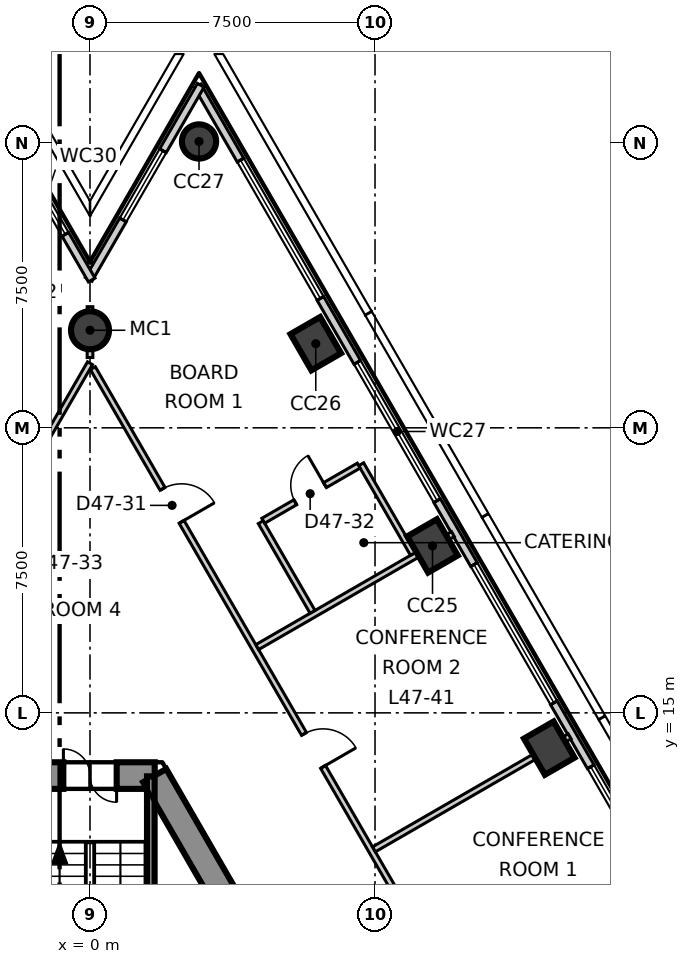
"""IFC4 building model, lengths in metres.
Left out: names, types, materials, properties, quantities, classifications, styles, units other than length and angle.
Written with IfcOpenShell. Run it as: python <this file> out.ifc"""

import sys

from ifc_helpers import new_model, si_unit, direction, frame, frame_2d, origin, origin_2d, place, context, subcontext, project, spatial, polyline, rectangle, circle, outline, extrude, element, fill, save


model = new_model("IFC4")
c1 = context("Model", 3, precision=1e-05, world=origin(), true_north=direction((0.0, 1.0)))
c2 = subcontext(c1, "Body", "Model", "MODEL_VIEW")
j1 = project(units=[si_unit("LENGTHUNIT", "METRE"), si_unit("PLANEANGLEUNIT", "RADIAN")], contexts=[c1])
p1 = place(None, origin())
s1 = spatial("IfcSite", under=j1, at=p1, CompositionType="ELEMENT")
p2 = place(p1, origin())
s2 = spatial("IfcBuilding", under=s1, at=p2, CompositionType="ELEMENT")
p3 = place(p2, frame((0.0, 0.0, 203.3)))
s3 = spatial("IfcBuildingStorey", under=s2, at=p3, CompositionType="ELEMENT", Elevation=203.3)
p4 = place(p3, frame((1.703, 13.35, -0.3), z_axis=(0.0, 0.0, 1.0), x_axis=(-1.0, 0.0, 0.0)))
e1 = element("IfcWall", 1, at=p4, inside=s3, PredefinedType="SHEAR", context=c2, shape_type="SweptSolid", body=[
    extrude(outline(polyline([(-0.202, -0.35), (1.703, -0.35), (3.608, -0.35), (3.204, 0.35), (1.703, 0.35), (0.202, 0.35), (-0.202, -0.35)])), origin(), (0.0, 0.0, 1.0), 4.0),
])
p5 = place(p4, frame((1.003, 0.0, 0.3)))
e2 = element("IfcOpeningElement", 2, at=p5, cuts=e1, PredefinedType="OPENING", context=c2, shape_type="SweptSolid", body=[
    extrude(rectangle(XDim=1.4, YDim=2.1, at=frame_2d((0.7, 1.05))), frame((0.0, 0.36, 0.0), z_axis=(0.0, -1.0, 0.0), x_axis=(1.0, 0.0, 0.0)), (0.0, 0.0, 1.0), 0.72),
])
p6 = place(p3, frame((12.413, -5.2, -0.3), z_axis=(0.0, 0.0, 1.0), x_axis=(-0.500011533395, 0.866018744874, 0.0)))
e3 = element("IfcWall", 3, at=p6, inside=s3, PredefinedType="SHEAR", context=c2, shape_type="SweptSolid", body=[
    extrude(outline(polyline([(-0.202, -0.35), (1.782, -0.35), (3.766, -0.35), (5.75, -0.35), (7.734, -0.35), (9.718, -0.35), (11.702, -0.35), (13.686, -0.35), (15.67, -0.35), (17.654, -0.35), (19.638, -0.35), (21.622, -0.35), (21.218, 0.35), (19.307, 0.35), (17.397, 0.35), (15.486, 0.35), (13.576, 0.35), (11.665, 0.35), (9.755, 0.35), (7.844, 0.35), (5.934, 0.35), (4.023, 0.35), (2.113, 0.35), (0.202, 0.35), (-0.202, -0.35)])), origin(), (0.0, 0.0, 1.0), 4.0),
])
p7 = place(p6, frame((4.055, 0.0, 0.3)))
e4 = element("IfcOpeningElement", 4, at=p7, cuts=e3, PredefinedType="OPENING", context=c2, shape_type="SweptSolid", body=[
    extrude(rectangle(XDim=0.9, YDim=2.1, at=frame_2d((0.45, 1.05))), frame((0.0, 0.36, 0.0), z_axis=(0.0, -1.0, 0.0), x_axis=(1.0, 0.0, 0.0)), (0.0, 0.0, 1.0), 0.72),
])
p8 = place(p6, frame((16.415, 0.0, 0.3)))
e5 = element("IfcOpeningElement", 5, at=p8, cuts=e3, PredefinedType="OPENING", context=c2, shape_type="SweptSolid", body=[
    extrude(rectangle(XDim=1.0, YDim=2.1, at=frame_2d((0.5, 1.05))), frame((0.0, 0.36, 0.0), z_axis=(0.0, -1.0, 0.0), x_axis=(1.0, 0.0, 0.0)), (0.0, 0.0, 1.0), 0.72),
])
for number, where, z_axis, x_axis in (
    (6, (12.085, 14.072, -0.3), (0.0, 0.0, 1.0), (-0.5, 0.866, 0.0)),
    (7, (9.013, 19.393, -0.3), (0.0, 0.0, 1.0), (-0.5, 0.866, 0.0)),
    (8, (5.941, 24.714, -0.3), (0.0, 0.0, 1.0), (-0.5, 0.866, 0.0)),
):
    element("IfcColumn", number, at=place(p3, frame(where, z_axis=z_axis, x_axis=x_axis)), inside=s3, PredefinedType="COLUMN", context=c2, shape_type="SweptSolid", body=[
        extrude(rectangle(XDim=1.1, YDim=0.9, at=origin_2d()), origin(), (0.0, 0.0, 1.0), 4.0),
    ])
p9 = place(p3, frame((2.869, 30.035, -0.3), z_axis=(0.0, 0.0, 1.0), x_axis=(-0.5, 0.866025403784, 0.0)))
e9 = element("IfcColumn", 9, at=p9, inside=s3, PredefinedType="COLUMN", context=c2, shape_type="SweptSolid", body=[
    extrude(circle(Radius=0.45, at=origin_2d()), origin(), (0.0, 0.0, 1.0), 4.0),
])
p10 = place(p3, frame((0.0, 25.067, -0.3), z_axis=(0.0, 0.0, 1.0), x_axis=(1.0, 0.0, 0.0)))
e10 = element("IfcColumn", 10, at=p10, inside=s3, PredefinedType="COLUMN", context=c2, shape_type="SweptSolid", body=[
    extrude(circle(Radius=0.5, at=origin_2d()), origin(), (0.0, 0.0, 1.0), 4.0),
])
p11 = place(p3, frame((28.704, -13.311, 0.0), z_axis=(0.0, 0.0, 1.0), x_axis=(-0.500010281129, 0.866019467891, 0.0)))
e11 = element("IfcWall", 11, at=p11, inside=s3, PredefinedType="ELEMENTEDWALL", context=c2, shape_type="SweptSolid", body=[
    extrude(rectangle(XDim=51.739, YDim=0.2, at=frame_2d((25.87, 0.0))), origin(), (0.0, 0.0, 1.0), 3.7),
])
p12 = place(p11, frame((2.275, 0.0, 0.9)))
e12 = element("IfcOpeningElement", 12, at=p12, cuts=e11, PredefinedType="OPENING", context=c2, shape_type="SweptSolid", body=[
    extrude(rectangle(XDim=4.2, YDim=2.5, at=frame_2d((2.1, 1.25))), frame((0.0, 0.11, 0.0), z_axis=(0.0, -1.0, 0.0), x_axis=(1.0, 0.0, 0.0)), (0.0, 0.0, 1.0), 0.22),
])
p13 = place(p11, frame((8.419, 0.0, 0.9)))
e13 = element("IfcOpeningElement", 13, at=p13, cuts=e11, PredefinedType="OPENING", context=c2, shape_type="SweptSolid", body=[
    extrude(rectangle(XDim=4.2, YDim=2.5, at=frame_2d((2.1, 1.25))), frame((0.0, 0.11, 0.0), z_axis=(0.0, -1.0, 0.0), x_axis=(1.0, 0.0, 0.0)), (0.0, 0.0, 1.0), 0.22),
])
p14 = place(p11, frame((14.563, 0.0, 0.9)))
e14 = element("IfcOpeningElement", 14, at=p14, cuts=e11, PredefinedType="OPENING", context=c2, shape_type="SweptSolid", body=[
    extrude(rectangle(XDim=4.2, YDim=2.5, at=frame_2d((2.1, 1.25))), frame((0.0, 0.11, 0.0), z_axis=(0.0, -1.0, 0.0), x_axis=(1.0, 0.0, 0.0)), (0.0, 0.0, 1.0), 0.22),
])
p15 = place(p11, frame((20.707, 0.0, 0.9)))
e15 = element("IfcOpeningElement", 15, at=p15, cuts=e11, PredefinedType="OPENING", context=c2, shape_type="SweptSolid", body=[
    extrude(rectangle(XDim=4.2, YDim=2.5, at=frame_2d((2.1, 1.25))), frame((0.0, 0.11, 0.0), z_axis=(0.0, -1.0, 0.0), x_axis=(1.0, 0.0, 0.0)), (0.0, 0.0, 1.0), 0.22),
])
p16 = place(p11, frame((26.852, 0.0, 0.9)))
e16 = element("IfcOpeningElement", 16, at=p16, cuts=e11, PredefinedType="OPENING", context=c2, shape_type="SweptSolid", body=[
    extrude(rectangle(XDim=4.2, YDim=2.5, at=frame_2d((2.1, 1.25))), frame((0.0, 0.11, 0.0), z_axis=(0.0, -1.0, 0.0), x_axis=(1.0, 0.0, 0.0)), (0.0, 0.0, 1.0), 0.22),
])
p17 = place(p11, frame((32.996, 0.0, 0.9)))
e17 = element("IfcOpeningElement", 17, at=p17, cuts=e11, PredefinedType="OPENING", context=c2, shape_type="SweptSolid", body=[
    extrude(rectangle(XDim=4.2, YDim=2.5, at=frame_2d((2.1, 1.25))), frame((0.0, 0.11, 0.0), z_axis=(0.0, -1.0, 0.0), x_axis=(1.0, 0.0, 0.0)), (0.0, 0.0, 1.0), 0.22),
])
p18 = place(p11, frame((39.14, 0.0, 0.9)))
e18 = element("IfcOpeningElement", 18, at=p18, cuts=e11, PredefinedType="OPENING", context=c2, shape_type="SweptSolid", body=[
    extrude(rectangle(XDim=4.2, YDim=2.5, at=frame_2d((2.1, 1.25))), frame((0.0, 0.11, 0.0), z_axis=(0.0, -1.0, 0.0), x_axis=(1.0, 0.0, 0.0)), (0.0, 0.0, 1.0), 0.22),
])
p19 = place(p11, frame((45.284, 0.0, 0.9)))
e19 = element("IfcOpeningElement", 19, at=p19, cuts=e11, PredefinedType="OPENING", context=c2, shape_type="SweptSolid", body=[
    extrude(rectangle(XDim=4.2, YDim=2.5, at=frame_2d((2.1, 1.25))), frame((0.0, 0.11, 0.0), z_axis=(0.0, -1.0, 0.0), x_axis=(1.0, 0.0, 0.0)), (0.0, 0.0, 1.0), 0.22),
])
p20 = place(p3, frame((2.914, 31.513, 0.0), z_axis=(0.0, 0.0, 1.0), x_axis=(-0.500061696128, -0.865989780578, 0.0)))
e20 = element("IfcWall", 20, at=p20, inside=s3, PredefinedType="ELEMENTEDWALL", context=c2, shape_type="SweptSolid", body=[
    extrude(rectangle(XDim=5.897, YDim=0.2, at=frame_2d((2.949, 0.0))), origin(), (0.0, 0.0, 1.0), 3.7),
])
p21 = place(p20, frame((1.99, 0.0, 0.9)))
e21 = element("IfcOpeningElement", 21, at=p21, cuts=e20, PredefinedType="OPENING", context=c2, shape_type="SweptSolid", body=[
    extrude(rectangle(XDim=2.1, YDim=2.5, at=frame_2d((1.05, 1.25))), frame((0.0, 0.11, 0.0), z_axis=(0.0, -1.0, 0.0), x_axis=(1.0, 0.0, 0.0)), (0.0, 0.0, 1.0), 0.22),
])
p22 = place(p3, frame((0.045, 26.389, 0.0), z_axis=(0.0, 0.0, 1.0), x_axis=(-0.500043768782, 0.866000132391, 0.0)))
e22 = element("IfcWall", 22, at=p22, inside=s3, PredefinedType="ELEMENTEDWALL", context=c2, shape_type="SweptSolid", body=[
    extrude(rectangle(XDim=5.897, YDim=0.2, at=frame_2d((2.949, 0.0))), origin(), (0.0, 0.0, 1.0), 3.7),
])
p23 = place(p22, frame((1.39, 0.0, 0.9)))
e23 = element("IfcOpeningElement", 23, at=p23, cuts=e22, PredefinedType="OPENING", context=c2, shape_type="SweptSolid", body=[
    extrude(rectangle(XDim=2.1, YDim=2.5, at=frame_2d((1.05, 1.25))), frame((0.0, 0.11, 0.0), z_axis=(0.0, -1.0, 0.0), x_axis=(1.0, 0.0, 0.0)), (0.0, 0.0, 1.0), 0.22),
])
p24 = place(p3, frame((-20.883, -11.97, 0.0), z_axis=(0.0, 0.0, 1.0), x_axis=(0.500006150555, 0.866021852731, 0.0)))
e24 = element("IfcWall", 24, at=p24, inside=s3, PredefinedType="PARTITIONING", context=c2, shape_type="SweptSolid", body=[
    extrude(rectangle(XDim=41.766, YDim=0.15, at=frame_2d((20.883, 0.0))), origin(), (0.0, 0.0, 1.0), 3.7),
])
p25 = place(p24, frame((36.916, 0.0, 0.0)))
e25 = element("IfcOpeningElement", 25, at=p25, cuts=e24, PredefinedType="OPENING", context=c2, shape_type="SweptSolid", body=[
    extrude(rectangle(XDim=1.1, YDim=2.1, at=frame_2d((0.55, 1.05))), frame((0.0, 0.085, 0.0), z_axis=(0.0, -1.0, 0.0), x_axis=(1.0, 0.0, 0.0)), (0.0, 0.0, 1.0), 0.17),
])
p26 = place(p24, frame((26.446, 0.0, 0.0)))
e26 = element("IfcOpeningElement", 26, at=p26, cuts=e24, PredefinedType="OPENING", context=c2, shape_type="SweptSolid", body=[
    extrude(rectangle(XDim=1.1, YDim=2.1, at=frame_2d((0.55, 1.05))), frame((0.0, 0.085, 0.0), z_axis=(0.0, -1.0, 0.0), x_axis=(1.0, 0.0, 0.0)), (0.0, 0.0, 1.0), 0.17),
])
p27 = place(p24, frame((9.757, 0.0, 0.0)))
e27 = element("IfcOpeningElement", 27, at=p27, cuts=e24, PredefinedType="OPENING", context=c2, shape_type="SweptSolid", body=[
    extrude(rectangle(XDim=1.1, YDim=2.1, at=frame_2d((0.55, 1.05))), frame((0.0, 0.085, 0.0), z_axis=(0.0, -1.0, 0.0), x_axis=(1.0, 0.0, 0.0)), (0.0, 0.0, 1.0), 0.17),
])
p28 = place(p24, frame((18.757, 0.0, 0.0)))
e28 = element("IfcOpeningElement", 28, at=p28, cuts=e24, PredefinedType="OPENING", context=c2, shape_type="SweptSolid", body=[
    extrude(rectangle(XDim=0.9, YDim=2.1, at=frame_2d((0.45, 1.05))), frame((0.0, 0.085, 0.0), z_axis=(0.0, -1.0, 0.0), x_axis=(1.0, 0.0, 0.0)), (0.0, 0.0, 1.0), 0.17),
])
p29 = place(p24, frame((15.557, 0.0, 0.0)))
e29 = element("IfcOpeningElement", 29, at=p29, cuts=e24, PredefinedType="OPENING", context=c2, shape_type="SweptSolid", body=[
    extrude(rectangle(XDim=0.9, YDim=2.1, at=frame_2d((0.45, 1.05))), frame((0.0, 0.085, 0.0), z_axis=(0.0, -1.0, 0.0), x_axis=(1.0, 0.0, 0.0)), (0.0, 0.0, 1.0), 0.17),
])
p30 = place(p24, frame((12.657, 0.0, 0.0)))
e30 = element("IfcOpeningElement", 30, at=p30, cuts=e24, PredefinedType="OPENING", context=c2, shape_type="SweptSolid", body=[
    extrude(rectangle(XDim=1.0, YDim=2.1, at=frame_2d((0.5, 1.05))), frame((0.0, 0.085, 0.0), z_axis=(0.0, -1.0, 0.0), x_axis=(1.0, 0.0, 0.0)), (0.0, 0.0, 1.0), 0.17),
])
p31 = place(p24, frame((3.669, 0.0, 0.0)))
e31 = element("IfcOpeningElement", 31, at=p31, cuts=e24, PredefinedType="OPENING", context=c2, shape_type="SweptSolid", body=[
    extrude(rectangle(XDim=1.1, YDim=2.1, at=frame_2d((0.55, 1.05))), frame((0.0, 0.085, 0.0), z_axis=(0.0, -1.0, 0.0), x_axis=(1.0, 0.0, 0.0)), (0.0, 0.0, 1.0), 0.17),
])
p32 = place(p3, frame((0.0, 24.35, 0.0), z_axis=(0.0, 0.0, 1.0), x_axis=(0.0, 1.0, 0.0)))
e32 = element("IfcWall", 32, at=p32, inside=s3, PredefinedType="PARTITIONING", context=c2, shape_type="SweptSolid", body=[
    extrude(rectangle(XDim=1.337, YDim=0.15, at=frame_2d((0.668, 0.0))), origin(), (0.0, 0.0, 1.0), 3.2),
])
p33 = place(p3, frame((0.075, 24.07, 0.0), z_axis=(0.0, 0.0, 1.0), x_axis=(0.500006834213, -0.866021458014, 0.0)))
e33 = element("IfcWall", 33, at=p33, inside=s3, PredefinedType="PARTITIONING", context=c2, shape_type="SweptSolid", body=[
    extrude(rectangle(XDim=41.616, YDim=0.15, at=frame_2d((20.808, 0.0))), origin(), (0.0, 0.0, 1.0), 3.7),
])
p34 = place(p33, frame((36.915, 0.0, 0.0)))
e34 = element("IfcOpeningElement", 34, at=p34, cuts=e33, PredefinedType="OPENING", context=c2, shape_type="SweptSolid", body=[
    extrude(rectangle(XDim=1.1, YDim=2.1, at=frame_2d((0.55, 1.05))), frame((0.0, 0.085, 0.0), z_axis=(0.0, -1.0, 0.0), x_axis=(1.0, 0.0, 0.0)), (0.0, 0.0, 1.0), 0.17),
])
p35 = place(p33, frame((22.046, 0.0, 0.0)))
e35 = element("IfcOpeningElement", 35, at=p35, cuts=e33, PredefinedType="OPENING", context=c2, shape_type="SweptSolid", body=[
    extrude(rectangle(XDim=1.1, YDim=2.1, at=frame_2d((0.55, 1.05))), frame((0.0, 0.085, 0.0), z_axis=(0.0, -1.0, 0.0), x_axis=(1.0, 0.0, 0.0)), (0.0, 0.0, 1.0), 0.17),
])
p36 = place(p33, frame((31.046, 0.0, 0.0)))
e36 = element("IfcOpeningElement", 36, at=p36, cuts=e33, PredefinedType="OPENING", context=c2, shape_type="SweptSolid", body=[
    extrude(rectangle(XDim=0.9, YDim=2.1, at=frame_2d((0.45, 1.05))), frame((0.0, 0.085, 0.0), z_axis=(0.0, -1.0, 0.0), x_axis=(1.0, 0.0, 0.0)), (0.0, 0.0, 1.0), 0.17),
])
p37 = place(p33, frame((27.846, 0.0, 0.0)))
e37 = element("IfcOpeningElement", 37, at=p37, cuts=e33, PredefinedType="OPENING", context=c2, shape_type="SweptSolid", body=[
    extrude(rectangle(XDim=0.9, YDim=2.1, at=frame_2d((0.45, 1.05))), frame((0.0, 0.085, 0.0), z_axis=(0.0, -1.0, 0.0), x_axis=(1.0, 0.0, 0.0)), (0.0, 0.0, 1.0), 0.17),
])
p38 = place(p33, frame((24.946, 0.0, 0.0)))
e38 = element("IfcOpeningElement", 38, at=p38, cuts=e33, PredefinedType="OPENING", context=c2, shape_type="SweptSolid", body=[
    extrude(rectangle(XDim=1.0, YDim=2.1, at=frame_2d((0.5, 1.05))), frame((0.0, 0.085, 0.0), z_axis=(0.0, -1.0, 0.0), x_axis=(1.0, 0.0, 0.0)), (0.0, 0.0, 1.0), 0.17),
])
p39 = place(p33, frame((17.258, 0.0, 0.0)))
e39 = element("IfcOpeningElement", 39, at=p39, cuts=e33, PredefinedType="OPENING", context=c2, shape_type="SweptSolid", body=[
    extrude(rectangle(XDim=1.0, YDim=2.1, at=frame_2d((0.5, 1.05))), frame((0.0, 0.085, 0.0), z_axis=(0.0, -1.0, 0.0), x_axis=(1.0, 0.0, 0.0)), (0.0, 0.0, 1.0), 0.17),
])
p40 = place(p33, frame((11.114, 0.0, 0.0)))
e40 = element("IfcOpeningElement", 40, at=p40, cuts=e33, PredefinedType="OPENING", context=c2, shape_type="SweptSolid", body=[
    extrude(rectangle(XDim=1.0, YDim=2.1, at=frame_2d((0.5, 1.05))), frame((0.0, 0.085, 0.0), z_axis=(0.0, -1.0, 0.0), x_axis=(1.0, 0.0, 0.0)), (0.0, 0.0, 1.0), 0.17),
])
p41 = place(p33, frame((3.669, 0.0, 0.0)))
e41 = element("IfcOpeningElement", 41, at=p41, cuts=e33, PredefinedType="OPENING", context=c2, shape_type="SweptSolid", body=[
    extrude(rectangle(XDim=1.0, YDim=2.1, at=frame_2d((0.5, 1.05))), frame((0.0, 0.085, 0.0), z_axis=(0.0, -1.0, 0.0), x_axis=(1.0, 0.0, 0.0)), (0.0, 0.0, 1.0), 0.17),
])
p42 = place(p3, frame((4.4, 16.73, 0.0), z_axis=(0.0, 0.0, 1.0), x_axis=(0.866064581528, 0.499932136017, 0.0)))
e42 = element("IfcWall", 42, at=p42, inside=s3, PredefinedType="PARTITIONING", context=c2, shape_type="SweptSolid", body=[
    extrude(rectangle(XDim=5.947, YDim=0.15, at=frame_2d((2.973, 0.0))), origin(), (0.0, 0.0, 1.0), 3.7),
])
p43 = place(p3, frame((7.472, 11.409, 0.0), z_axis=(0.0, 0.0, 1.0), x_axis=(0.866046805426, 0.499962929437, 0.0)))
e43 = element("IfcWall", 43, at=p43, inside=s3, PredefinedType="PARTITIONING", context=c2, shape_type="SweptSolid", body=[
    extrude(rectangle(XDim=5.947, YDim=0.15, at=frame_2d((2.973, 0.0))), origin(), (0.0, 0.0, 1.0), 3.7),
])
for number, where, z_axis, x_axis in (
    (44, (7.136, 21.542, 0.0), (0.0, 0.0, 1.0), (0.5, -0.866, 0.0)),
    (45, (4.494, 20.017, 0.0), (0.0, 0.0, 1.0), (0.5, -0.866, 0.0)),
):
    element("IfcWall", number, at=place(p3, frame(where, z_axis=z_axis, x_axis=x_axis)), inside=s3, PredefinedType="PARTITIONING", context=c2, shape_type="SweptSolid", body=[
        extrude(rectangle(XDim=2.725, YDim=0.15, at=frame_2d((1.362, 0.0))), origin(), (0.0, 0.0, 1.0), 3.7),
    ])
p44 = place(p3, frame((4.559, 20.054, 0.0), z_axis=(0.0, 0.0, 1.0), x_axis=(0.865929066901, 0.500166823267, 0.0)))
e46 = element("IfcWall", 46, at=p44, inside=s3, PredefinedType="PARTITIONING", context=c2, shape_type="SweptSolid", body=[
    extrude(rectangle(XDim=2.901, YDim=0.15, at=frame_2d((1.45, 0.0))), origin(), (0.0, 0.0, 1.0), 3.7),
])
p45 = place(p44, frame((0.975, 0.0, 0.0)))
e47 = element("IfcOpeningElement", 47, at=p45, cuts=e46, PredefinedType="OPENING", context=c2, shape_type="SweptSolid", body=[
    extrude(rectangle(XDim=0.9, YDim=2.1, at=frame_2d((0.45, 1.05))), frame((0.0, 0.085, 0.0), z_axis=(0.0, -1.0, 0.0), x_axis=(1.0, 0.0, 0.0)), (0.0, 0.0, 1.0), 0.17),
])
p46 = place(p3, frame((1.6, 6.615, 0.0), z_axis=(0.0, 0.0, 1.0), x_axis=(0.0, 1.0, 0.0)))
e48 = element("IfcWall", 48, at=p46, inside=s3, PredefinedType="SOLIDWALL", context=c2, shape_type="SweptSolid", body=[
    extrude(rectangle(XDim=6.715, YDim=0.2, at=frame_2d((3.357, 0.0))), origin(), (0.0, 0.0, 1.0), 3.7),
])
p47 = place(p16, origin())
e49 = element("IfcWindow", 49, at=p47, inside=s3, PartitioningType="SINGLE_PANEL", PredefinedType="WINDOW", context=c2, shape_type="SweptSolid", body=[
    extrude(rectangle(XDim=4.2, YDim=2.5, at=frame_2d((2.1, 1.25))), frame((0.0, 0.03, 0.0), z_axis=(0.0, -1.0, 0.0), x_axis=(1.0, 0.0, 0.0)), (0.0, 0.0, 1.0), 0.06),
])
fill(e16, e49)
p48 = place(p17, origin())
e50 = element("IfcWindow", 50, at=p48, inside=s3, PartitioningType="SINGLE_PANEL", PredefinedType="WINDOW", context=c2, shape_type="SweptSolid", body=[
    extrude(rectangle(XDim=4.2, YDim=2.5, at=frame_2d((2.1, 1.25))), frame((0.0, 0.03, 0.0), z_axis=(0.0, -1.0, 0.0), x_axis=(1.0, 0.0, 0.0)), (0.0, 0.0, 1.0), 0.06),
])
fill(e17, e50)
p49 = place(p18, origin())
e51 = element("IfcWindow", 51, at=p49, inside=s3, PartitioningType="SINGLE_PANEL", PredefinedType="WINDOW", context=c2, shape_type="SweptSolid", body=[
    extrude(rectangle(XDim=4.2, YDim=2.5, at=frame_2d((2.1, 1.25))), frame((0.0, 0.03, 0.0), z_axis=(0.0, -1.0, 0.0), x_axis=(1.0, 0.0, 0.0)), (0.0, 0.0, 1.0), 0.06),
])
fill(e18, e51)
p50 = place(p19, origin())
e52 = element("IfcWindow", 52, at=p50, inside=s3, PartitioningType="SINGLE_PANEL", PredefinedType="WINDOW", context=c2, shape_type="SweptSolid", body=[
    extrude(rectangle(XDim=4.2, YDim=2.5, at=frame_2d((2.1, 1.25))), frame((0.0, 0.03, 0.0), z_axis=(0.0, -1.0, 0.0), x_axis=(1.0, 0.0, 0.0)), (0.0, 0.0, 1.0), 0.06),
])
fill(e19, e52)
p51 = place(p21, origin())
e53 = element("IfcWindow", 53, at=p51, inside=s3, PartitioningType="SINGLE_PANEL", PredefinedType="WINDOW", context=c2, shape_type="SweptSolid", body=[
    extrude(rectangle(XDim=2.1, YDim=2.5, at=frame_2d((1.05, 1.25))), frame((0.0, 0.03, 0.0), z_axis=(0.0, -1.0, 0.0), x_axis=(1.0, 0.0, 0.0)), (0.0, 0.0, 1.0), 0.06),
])
fill(e21, e53)
p52 = place(p23, origin())
e54 = element("IfcWindow", 54, at=p52, inside=s3, PartitioningType="SINGLE_PANEL", PredefinedType="WINDOW", context=c2, shape_type="SweptSolid", body=[
    extrude(rectangle(XDim=2.1, YDim=2.5, at=frame_2d((1.05, 1.25))), frame((0.0, 0.03, 0.0), z_axis=(0.0, -1.0, 0.0), x_axis=(1.0, 0.0, 0.0)), (0.0, 0.0, 1.0), 0.06),
])
fill(e23, e54)
p53 = place(p40, origin())
e55 = element("IfcDoor", 55, at=p53, inside=s3, OperationType="SINGLE_SWING_LEFT", PredefinedType="DOOR", context=c2, shape_type="SweptSolid", body=[
    extrude(rectangle(XDim=1.0, YDim=2.1, at=frame_2d((0.5, 1.05))), frame((0.0, 0.025, 0.0), z_axis=(0.0, -1.0, 0.0), x_axis=(1.0, 0.0, 0.0)), (0.0, 0.0, 1.0), 0.05),
])
fill(e40, e55)
p54 = place(p41, origin())
e56 = element("IfcDoor", 56, at=p54, inside=s3, OperationType="SINGLE_SWING_LEFT", PredefinedType="DOOR", context=c2, shape_type="SweptSolid", body=[
    extrude(rectangle(XDim=1.0, YDim=2.1, at=frame_2d((0.5, 1.05))), frame((0.0, 0.025, 0.0), z_axis=(0.0, -1.0, 0.0), x_axis=(1.0, 0.0, 0.0)), (0.0, 0.0, 1.0), 0.05),
])
fill(e41, e56)
p55 = place(p45, origin())
e57 = element("IfcDoor", 57, at=p55, inside=s3, OperationType="SINGLE_SWING_LEFT", PredefinedType="DOOR", context=c2, shape_type="SweptSolid", body=[
    extrude(rectangle(XDim=0.9, YDim=2.1, at=frame_2d((0.45, 1.05))), frame((0.0, 0.025, 0.0), z_axis=(0.0, -1.0, 0.0), x_axis=(1.0, 0.0, 0.0)), (0.0, 0.0, 1.0), 0.05),
])
fill(e47, e57)
p56 = place(p5, origin())
e58 = element("IfcDoor", 58, at=p56, inside=s3, OperationType="DOUBLE_DOOR_SINGLE_SWING", PredefinedType="DOOR", context=c2, shape_type="SweptSolid", body=[
    extrude(rectangle(XDim=1.4, YDim=2.1, at=frame_2d((0.7, 1.05))), frame((0.0, 0.025, 0.0), z_axis=(0.0, -1.0, 0.0), x_axis=(1.0, 0.0, 0.0)), (0.0, 0.0, 1.0), 0.05),
])
fill(e2, e58)
save(model, sys.argv[1])
